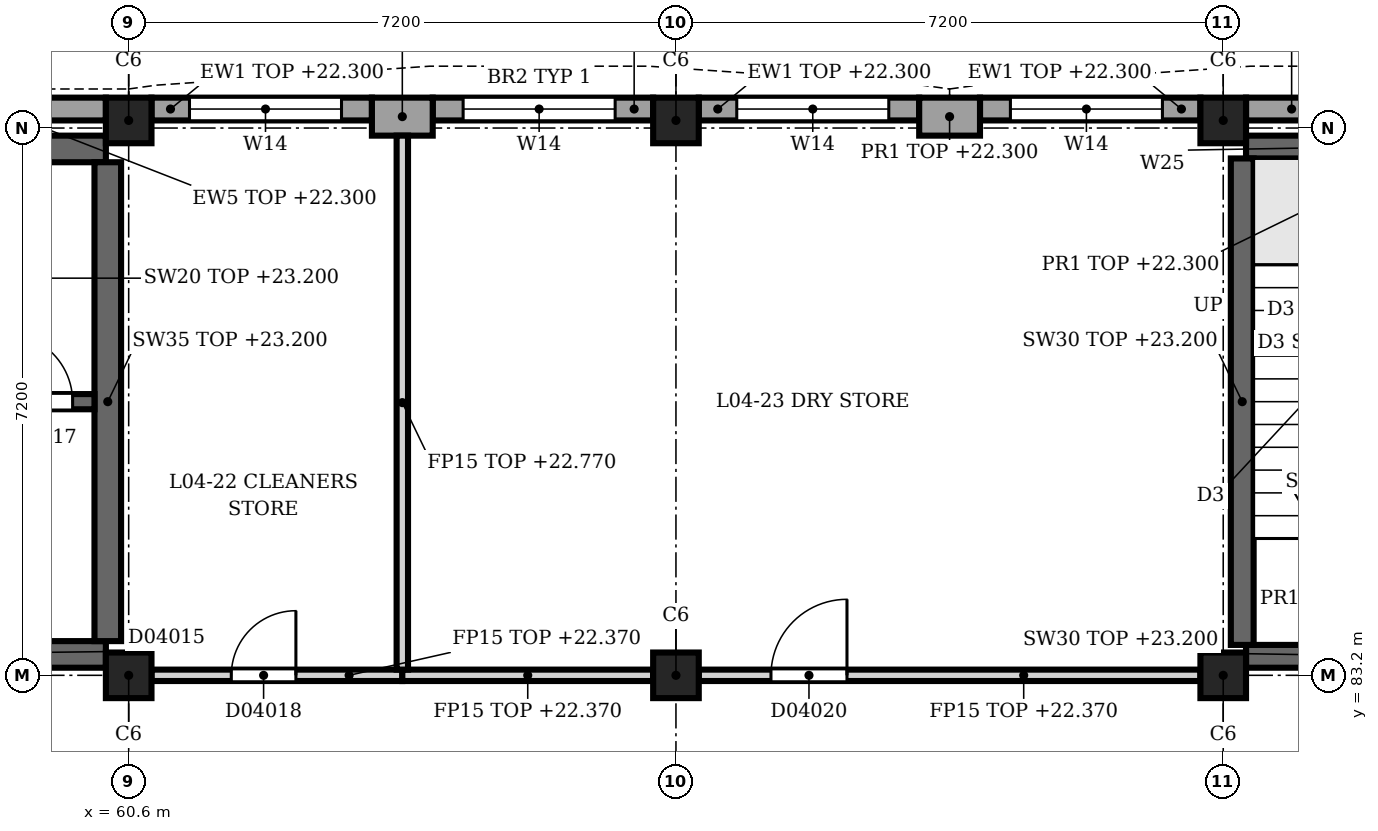
"""IFC4 building model, lengths in metres.
Left out: names, types, materials, properties, quantities, classifications, styles, units other than length and angle.
Written with IfcOpenShell. Run it as: python <this file> out.ifc"""

import sys

from ifc_helpers import new_model, si_unit, direction, frame, frame_2d, origin, origin_2d, place, context, subcontext, project, spatial, rectangle, extrude, element, fill, save


model = new_model("IFC4")
c1 = context("Model", 3, precision=1e-05, world=origin(), true_north=direction((0.0, 1.0)))
c2 = subcontext(c1, "Body", "Model", "MODEL_VIEW")
j1 = project(units=[si_unit("LENGTHUNIT", "METRE"), si_unit("PLANEANGLEUNIT", "RADIAN")], contexts=[c1])
p1 = place(None, origin())
s1 = spatial("IfcSite", under=j1, at=p1, CompositionType="ELEMENT")
p2 = place(p1, origin())
s2 = spatial("IfcBuilding", under=s1, at=p2, CompositionType="ELEMENT")
p3 = place(p2, frame((0.0, 0.0, 18.9)))
s3 = spatial("IfcBuildingStorey", under=s2, at=p3, CompositionType="ELEMENT", Elevation=18.9)
for number, where, z_axis, x_axis in (
    (1, (60.6, 83.2, 0.0), (0.0, 0.0, 1.0), (1.0, 0.0, 0.0)),
    (2, (60.6, 90.5, 0.0), (0.0, 0.0, 1.0), (1.0, 0.0, 0.0)),
    (3, (67.8, 83.2, 0.0), (0.0, 0.0, 1.0), (1.0, 0.0, 0.0)),
    (4, (67.8, 90.5, 0.0), (0.0, 0.0, 1.0), (1.0, 0.0, 0.0)),
    (5, (75.0, 83.2, 0.0), (0.0, 0.0, 1.0), (1.0, 0.0, 0.0)),
    (6, (75.0, 90.5, 0.0), (0.0, 0.0, 1.0), (1.0, 0.0, 0.0)),
):
    element("IfcColumn", number, at=place(p3, frame(where, z_axis=z_axis, x_axis=x_axis)), inside=s3, PredefinedType="COLUMN", context=c2, shape_type="SweptSolid", body=[
        extrude(rectangle(XDim=0.6, YDim=0.6, at=origin_2d()), origin(), (0.0, 0.0, 1.0), 4.5),
    ])
for number, where, z_axis, x_axis in (
    (7, (63.8, 90.55, 0.0), (0.0, 0.0, 1.0), (1.0, 0.0, 0.0)),
    (8, (71.0, 90.55, 0.0), (0.0, 0.0, 1.0), (1.0, 0.0, 0.0)),
):
    element("IfcWall", number, at=place(p3, frame(where, z_axis=z_axis, x_axis=x_axis)), inside=s3, PredefinedType="SOLIDWALL", context=c2, shape_type="SweptSolid", body=[
        extrude(rectangle(XDim=0.8, YDim=0.5, at=frame_2d((0.4, 0.0))), origin(), (0.0, 0.0, 1.0), 3.4),
    ])
p4 = place(p3, frame((57.4, 90.65, 0.0), z_axis=(0.0, 0.0, 1.0), x_axis=(1.0, 0.0, 0.0)))
e9 = element("IfcWall", 9, at=p4, inside=s3, PredefinedType="SOLIDWALL", context=c2, shape_type="SweptSolid", body=[
    extrude(rectangle(XDim=2.9, YDim=0.3, at=frame_2d((1.45, 0.0))), origin(), (0.0, 0.0, 1.0), 3.4),
])
p5 = place(p3, frame((60.9, 90.65, 0.0), z_axis=(0.0, 0.0, 1.0), x_axis=(1.0, 0.0, 0.0)))
e10 = element("IfcWall", 10, at=p5, inside=s3, PredefinedType="SOLIDWALL", context=c2, shape_type="SweptSolid", body=[
    extrude(rectangle(XDim=2.9, YDim=0.3, at=frame_2d((1.45, 0.0))), origin(), (0.0, 0.0, 1.0), 3.4),
])
p6 = place(p5, frame((0.5, 0.0, 0.9)))
e11 = element("IfcOpeningElement", 11, at=p6, cuts=e10, PredefinedType="OPENING", context=c2, shape_type="SweptSolid", body=[
    extrude(rectangle(XDim=2.0, YDim=2.4, at=frame_2d((1.0, 1.2))), frame((0.0, 0.16, 0.0), z_axis=(0.0, -1.0, 0.0), x_axis=(1.0, 0.0, 0.0)), (0.0, 0.0, 1.0), 0.32),
])
p7 = place(p3, frame((64.6, 90.65, 0.0), z_axis=(0.0, 0.0, 1.0), x_axis=(1.0, 0.0, 0.0)))
e12 = element("IfcWall", 12, at=p7, inside=s3, PredefinedType="SOLIDWALL", context=c2, shape_type="SweptSolid", body=[
    extrude(rectangle(XDim=2.9, YDim=0.3, at=frame_2d((1.45, 0.0))), origin(), (0.0, 0.0, 1.0), 3.4),
])
p8 = place(p7, frame((0.4, 0.0, 0.9)))
e13 = element("IfcOpeningElement", 13, at=p8, cuts=e12, PredefinedType="OPENING", context=c2, shape_type="SweptSolid", body=[
    extrude(rectangle(XDim=2.0, YDim=2.4, at=frame_2d((1.0, 1.2))), frame((0.0, 0.16, 0.0), z_axis=(0.0, -1.0, 0.0), x_axis=(1.0, 0.0, 0.0)), (0.0, 0.0, 1.0), 0.32),
])
p9 = place(p3, frame((68.1, 90.65, 0.0), z_axis=(0.0, 0.0, 1.0), x_axis=(1.0, 0.0, 0.0)))
e14 = element("IfcWall", 14, at=p9, inside=s3, PredefinedType="SOLIDWALL", context=c2, shape_type="SweptSolid", body=[
    extrude(rectangle(XDim=2.9, YDim=0.3, at=frame_2d((1.45, 0.0))), origin(), (0.0, 0.0, 1.0), 3.4),
])
p10 = place(p9, frame((0.5, 0.0, 0.9)))
e15 = element("IfcOpeningElement", 15, at=p10, cuts=e14, PredefinedType="OPENING", context=c2, shape_type="SweptSolid", body=[
    extrude(rectangle(XDim=2.0, YDim=2.4, at=frame_2d((1.0, 1.2))), frame((0.0, 0.16, 0.0), z_axis=(0.0, -1.0, 0.0), x_axis=(1.0, 0.0, 0.0)), (0.0, 0.0, 1.0), 0.32),
])
p11 = place(p3, frame((71.8, 90.65, 0.0), z_axis=(0.0, 0.0, 1.0), x_axis=(1.0, 0.0, 0.0)))
e16 = element("IfcWall", 16, at=p11, inside=s3, PredefinedType="SOLIDWALL", context=c2, shape_type="SweptSolid", body=[
    extrude(rectangle(XDim=2.9, YDim=0.3, at=frame_2d((1.45, 0.0))), origin(), (0.0, 0.0, 1.0), 3.4),
])
p12 = place(p11, frame((0.4, 0.0, 0.9)))
e17 = element("IfcOpeningElement", 17, at=p12, cuts=e16, PredefinedType="OPENING", context=c2, shape_type="SweptSolid", body=[
    extrude(rectangle(XDim=2.0, YDim=2.4, at=frame_2d((1.0, 1.2))), frame((0.0, 0.16, 0.0), z_axis=(0.0, -1.0, 0.0), x_axis=(1.0, 0.0, 0.0)), (0.0, 0.0, 1.0), 0.32),
])
p13 = place(p3, frame((75.3, 90.65, 0.0), z_axis=(0.0, 0.0, 1.0), x_axis=(1.0, 0.0, 0.0)))
e18 = element("IfcWall", 18, at=p13, inside=s3, PredefinedType="SOLIDWALL", context=c2, shape_type="SweptSolid", body=[
    extrude(rectangle(XDim=2.9, YDim=0.3, at=frame_2d((1.45, 0.0))), origin(), (0.0, 0.0, 1.0), 3.4),
])
p14 = place(p13, frame((1.2, 0.0, 1.2)))
e19 = element("IfcOpeningElement", 19, at=p14, cuts=e18, PredefinedType="OPENING", context=c2, shape_type="SweptSolid", body=[
    extrude(rectangle(XDim=0.6, YDim=1.8, at=frame_2d((0.3, 0.9))), frame((0.0, 0.16, 0.0), z_axis=(0.0, -1.0, 0.0), x_axis=(1.0, 0.0, 0.0)), (0.0, 0.0, 1.0), 0.32),
])
p15 = place(p3, frame((53.7, 83.475, 0.0), z_axis=(0.0, 0.0, 1.0), x_axis=(1.0, 0.0, 0.0)))
e20 = element("IfcWall", 20, at=p15, inside=s3, PredefinedType="SHEAR", context=c2, shape_type="SweptSolid", body=[
    extrude(rectangle(XDim=6.6, YDim=0.35, at=frame_2d((3.3, 0.0))), origin(), (0.0, 0.0, 1.0), 4.3),
])
p16 = place(p15, frame((2.7, 0.0, 0.0)))
e21 = element("IfcOpeningElement", 21, at=p16, cuts=e20, PredefinedType="OPENING", context=c2, shape_type="SweptSolid", body=[
    extrude(rectangle(XDim=1.8, YDim=2.1, at=frame_2d((0.9, 1.05))), frame((0.0, 0.185, 0.0), z_axis=(0.0, -1.0, 0.0), x_axis=(1.0, 0.0, 0.0)), (0.0, 0.0, 1.0), 0.37),
])
p17 = place(p3, frame((53.7, 90.125, 0.0), z_axis=(0.0, 0.0, 1.0), x_axis=(1.0, 0.0, 0.0)))
e22 = element("IfcWall", 22, at=p17, inside=s3, PredefinedType="SHEAR", context=c2, shape_type="SweptSolid", body=[
    extrude(rectangle(XDim=6.6, YDim=0.35, at=frame_2d((3.3, 0.0))), origin(), (0.0, 0.0, 1.0), 4.3),
])
p18 = place(p3, frame((60.325, 83.65, 0.0), z_axis=(0.0, 0.0, 1.0), x_axis=(0.0, 1.0, 0.0)))
e23 = element("IfcWall", 23, at=p18, inside=s3, PredefinedType="SHEAR", context=c2, shape_type="SweptSolid", body=[
    extrude(rectangle(XDim=6.3, YDim=0.35, at=frame_2d((3.15, 0.0))), origin(), (0.0, 0.0, 1.0), 4.3),
])
p19 = place(p3, frame((60.15, 86.8, 0.0), z_axis=(0.0, 0.0, 1.0), x_axis=(-1.0, 0.0, 0.0)))
e24 = element("IfcWall", 24, at=p19, inside=s3, PredefinedType="SHEAR", context=c2, shape_type="SweptSolid", body=[
    extrude(rectangle(XDim=10.35, YDim=0.2, at=frame_2d((5.175, 0.0))), origin(), (0.0, 0.0, 1.0), 4.3),
])
p20 = place(p19, frame((8.8, 0.0, 0.0)))
e25 = element("IfcOpeningElement", 25, at=p20, cuts=e24, PredefinedType="OPENING", context=c2, shape_type="SweptSolid", body=[
    extrude(rectangle(XDim=1.1, YDim=2.1, at=frame_2d((0.55, 1.05))), frame((0.0, 0.11, 0.0), z_axis=(0.0, -1.0, 0.0), x_axis=(1.0, 0.0, 0.0)), (0.0, 0.0, 1.0), 0.22),
])
p21 = place(p19, frame((6.6, 0.0, 0.0)))
e26 = element("IfcOpeningElement", 26, at=p21, cuts=e24, PredefinedType="OPENING", context=c2, shape_type="SweptSolid", body=[
    extrude(rectangle(XDim=1.1, YDim=2.1, at=frame_2d((0.55, 1.05))), frame((0.0, 0.11, 0.0), z_axis=(0.0, -1.0, 0.0), x_axis=(1.0, 0.0, 0.0)), (0.0, 0.0, 1.0), 0.22),
])
p22 = place(p19, frame((3.75, 0.0, 0.0)))
e27 = element("IfcOpeningElement", 27, at=p22, cuts=e24, PredefinedType="OPENING", context=c2, shape_type="SweptSolid", body=[
    extrude(rectangle(XDim=1.4, YDim=2.1, at=frame_2d((0.7, 1.05))), frame((0.0, 0.11, 0.0), z_axis=(0.0, -1.0, 0.0), x_axis=(1.0, 0.0, 0.0)), (0.0, 0.0, 1.0), 0.22),
])
p23 = place(p19, frame((1.962, 0.0, 0.0)))
e28 = element("IfcOpeningElement", 28, at=p23, cuts=e24, PredefinedType="OPENING", context=c2, shape_type="SweptSolid", body=[
    extrude(rectangle(XDim=0.9, YDim=2.1, at=frame_2d((0.45, 1.05))), frame((0.0, 0.11, 0.0), z_axis=(0.0, -1.0, 0.0), x_axis=(1.0, 0.0, 0.0)), (0.0, 0.0, 1.0), 0.22),
])
p24 = place(p19, frame((0.288, 0.0, 0.0)))
e29 = element("IfcOpeningElement", 29, at=p24, cuts=e24, PredefinedType="OPENING", context=c2, shape_type="SweptSolid", body=[
    extrude(rectangle(XDim=0.9, YDim=2.1, at=frame_2d((0.45, 1.05))), frame((0.0, 0.11, 0.0), z_axis=(0.0, -1.0, 0.0), x_axis=(1.0, 0.0, 0.0)), (0.0, 0.0, 1.0), 0.22),
])
p25 = place(p3, frame((75.3, 83.45, 0.0), z_axis=(0.0, 0.0, 1.0), x_axis=(1.0, 0.0, 0.0)))
e30 = element("IfcWall", 30, at=p25, inside=s3, PredefinedType="SHEAR", context=c2, shape_type="SweptSolid", body=[
    extrude(rectangle(XDim=6.7, YDim=0.3, at=frame_2d((3.35, 0.0))), origin(), (0.0, 0.0, 1.0), 4.3),
])
p26 = place(p25, frame((4.3, 0.0, 0.0)))
e31 = element("IfcOpeningElement", 31, at=p26, cuts=e30, PredefinedType="OPENING", context=c2, shape_type="SweptSolid", body=[
    extrude(rectangle(XDim=1.2, YDim=2.1, at=frame_2d((0.6, 1.05))), frame((0.0, 0.16, 0.0), z_axis=(0.0, -1.0, 0.0), x_axis=(1.0, 0.0, 0.0)), (0.0, 0.0, 1.0), 0.32),
])
p27 = place(p3, frame((75.3, 90.15, 0.0), z_axis=(0.0, 0.0, 1.0), x_axis=(1.0, 0.0, 0.0)))
e32 = element("IfcWall", 32, at=p27, inside=s3, PredefinedType="SHEAR", context=c2, shape_type="SweptSolid", body=[
    extrude(rectangle(XDim=6.7, YDim=0.3, at=frame_2d((3.35, 0.0))), origin(), (0.0, 0.0, 1.0), 4.3),
])
p28 = place(p27, frame((1.2, 0.0, 1.2)))
e33 = element("IfcOpeningElement", 33, at=p28, cuts=e32, PredefinedType="OPENING", context=c2, shape_type="SweptSolid", body=[
    extrude(rectangle(XDim=0.6, YDim=1.8, at=frame_2d((0.3, 0.9))), frame((0.0, 0.16, 0.0), z_axis=(0.0, -1.0, 0.0), x_axis=(1.0, 0.0, 0.0)), (0.0, 0.0, 1.0), 0.32),
])
p29 = place(p3, frame((75.25, 83.6, 0.0), z_axis=(0.0, 0.0, 1.0), x_axis=(0.0, 1.0, 0.0)))
e34 = element("IfcWall", 34, at=p29, inside=s3, PredefinedType="SHEAR", context=c2, shape_type="SweptSolid", body=[
    extrude(rectangle(XDim=6.4, YDim=0.3, at=frame_2d((3.2, 0.0))), origin(), (0.0, 0.0, 1.0), 4.3),
])
p30 = place(p3, frame((60.9, 83.2, 0.0), z_axis=(0.0, 0.0, 1.0), x_axis=(1.0, 0.0, 0.0)))
e35 = element("IfcWall", 35, at=p30, inside=s3, PredefinedType="PARTITIONING", context=c2, shape_type="SweptSolid", body=[
    extrude(rectangle(XDim=3.3, YDim=0.15, at=frame_2d((1.65, 0.0))), origin(), (0.0, 0.0, 1.0), 3.47),
])
p31 = place(p30, frame((1.05, 0.0, 0.0)))
e36 = element("IfcOpeningElement", 36, at=p31, cuts=e35, PredefinedType="OPENING", context=c2, shape_type="SweptSolid", body=[
    extrude(rectangle(XDim=0.85, YDim=2.1, at=frame_2d((0.425, 1.05))), frame((0.0, 0.085, 0.0), z_axis=(0.0, -1.0, 0.0), x_axis=(1.0, 0.0, 0.0)), (0.0, 0.0, 1.0), 0.17),
])
p32 = place(p3, frame((64.2, 83.2, 0.0), z_axis=(0.0, 0.0, 1.0), x_axis=(1.0, 0.0, 0.0)))
e37 = element("IfcWall", 37, at=p32, inside=s3, PredefinedType="PARTITIONING", context=c2, shape_type="SweptSolid", body=[
    extrude(rectangle(XDim=3.3, YDim=0.15, at=frame_2d((1.65, 0.0))), origin(), (0.0, 0.0, 1.0), 3.47),
])
p33 = place(p3, frame((68.1, 83.2, 0.0), z_axis=(0.0, 0.0, 1.0), x_axis=(1.0, 0.0, 0.0)))
e38 = element("IfcWall", 38, at=p33, inside=s3, PredefinedType="PARTITIONING", context=c2, shape_type="SweptSolid", body=[
    extrude(rectangle(XDim=6.6, YDim=0.15, at=frame_2d((3.3, 0.0))), origin(), (0.0, 0.0, 1.0), 3.47),
])
p34 = place(p33, frame((0.95, 0.0, 0.0)))
e39 = element("IfcOpeningElement", 39, at=p34, cuts=e38, PredefinedType="OPENING", context=c2, shape_type="SweptSolid", body=[
    extrude(rectangle(XDim=1.0, YDim=2.1, at=frame_2d((0.5, 1.05))), frame((0.0, 0.085, 0.0), z_axis=(0.0, -1.0, 0.0), x_axis=(1.0, 0.0, 0.0)), (0.0, 0.0, 1.0), 0.17),
])
p35 = place(p3, frame((64.2, 83.275, 0.0), z_axis=(0.0, 0.0, 1.0), x_axis=(0.0, 1.0, 0.0)))
e40 = element("IfcWall", 40, at=p35, inside=s3, PredefinedType="PARTITIONING", context=c2, shape_type="SweptSolid", body=[
    extrude(rectangle(XDim=7.025, YDim=0.15, at=frame_2d((3.513, 0.0))), origin(), (0.0, 0.0, 1.0), 3.87),
])
p36 = place(p6, origin())
e41 = element("IfcWindow", 41, at=p36, inside=s3, PartitioningType="SINGLE_PANEL", PredefinedType="WINDOW", context=c2, shape_type="SweptSolid", body=[
    extrude(rectangle(XDim=2.0, YDim=2.4, at=frame_2d((1.0, 1.2))), frame((0.0, 0.03, 0.0), z_axis=(0.0, -1.0, 0.0), x_axis=(1.0, 0.0, 0.0)), (0.0, 0.0, 1.0), 0.06),
])
fill(e11, e41)
p37 = place(p8, origin())
e42 = element("IfcWindow", 42, at=p37, inside=s3, PartitioningType="SINGLE_PANEL", PredefinedType="WINDOW", context=c2, shape_type="SweptSolid", body=[
    extrude(rectangle(XDim=2.0, YDim=2.4, at=frame_2d((1.0, 1.2))), frame((0.0, 0.03, 0.0), z_axis=(0.0, -1.0, 0.0), x_axis=(1.0, 0.0, 0.0)), (0.0, 0.0, 1.0), 0.06),
])
fill(e13, e42)
p38 = place(p10, origin())
e43 = element("IfcWindow", 43, at=p38, inside=s3, PartitioningType="SINGLE_PANEL", PredefinedType="WINDOW", context=c2, shape_type="SweptSolid", body=[
    extrude(rectangle(XDim=2.0, YDim=2.4, at=frame_2d((1.0, 1.2))), frame((0.0, 0.03, 0.0), z_axis=(0.0, -1.0, 0.0), x_axis=(1.0, 0.0, 0.0)), (0.0, 0.0, 1.0), 0.06),
])
fill(e15, e43)
p39 = place(p12, origin())
e44 = element("IfcWindow", 44, at=p39, inside=s3, PartitioningType="SINGLE_PANEL", PredefinedType="WINDOW", context=c2, shape_type="SweptSolid", body=[
    extrude(rectangle(XDim=2.0, YDim=2.4, at=frame_2d((1.0, 1.2))), frame((0.0, 0.03, 0.0), z_axis=(0.0, -1.0, 0.0), x_axis=(1.0, 0.0, 0.0)), (0.0, 0.0, 1.0), 0.06),
])
fill(e17, e44)
p40 = place(p24, origin())
e45 = element("IfcDoor", 45, at=p40, inside=s3, OperationType="SINGLE_SWING_LEFT", PredefinedType="DOOR", context=c2, shape_type="SweptSolid", body=[
    extrude(rectangle(XDim=0.9, YDim=2.1, at=frame_2d((0.45, 1.05))), frame((0.0, 0.025, 0.0), z_axis=(0.0, -1.0, 0.0), x_axis=(1.0, 0.0, 0.0)), (0.0, 0.0, 1.0), 0.05),
])
fill(e29, e45)
p41 = place(p31, origin())
e46 = element("IfcDoor", 46, at=p41, inside=s3, OperationType="SINGLE_SWING_LEFT", PredefinedType="DOOR", context=c2, shape_type="SweptSolid", body=[
    extrude(rectangle(XDim=0.85, YDim=2.1, at=frame_2d((0.425, 1.05))), frame((0.0, 0.025, 0.0), z_axis=(0.0, -1.0, 0.0), x_axis=(1.0, 0.0, 0.0)), (0.0, 0.0, 1.0), 0.05),
])
fill(e36, e46)
p42 = place(p34, origin())
e47 = element("IfcDoor", 47, at=p42, inside=s3, OperationType="SINGLE_SWING_LEFT", PredefinedType="DOOR", context=c2, shape_type="SweptSolid", body=[
    extrude(rectangle(XDim=1.0, YDim=2.1, at=frame_2d((0.5, 1.05))), frame((0.0, 0.025, 0.0), z_axis=(0.0, -1.0, 0.0), x_axis=(1.0, 0.0, 0.0)), (0.0, 0.0, 1.0), 0.05),
])
fill(e39, e47)
save(model, sys.argv[1])
